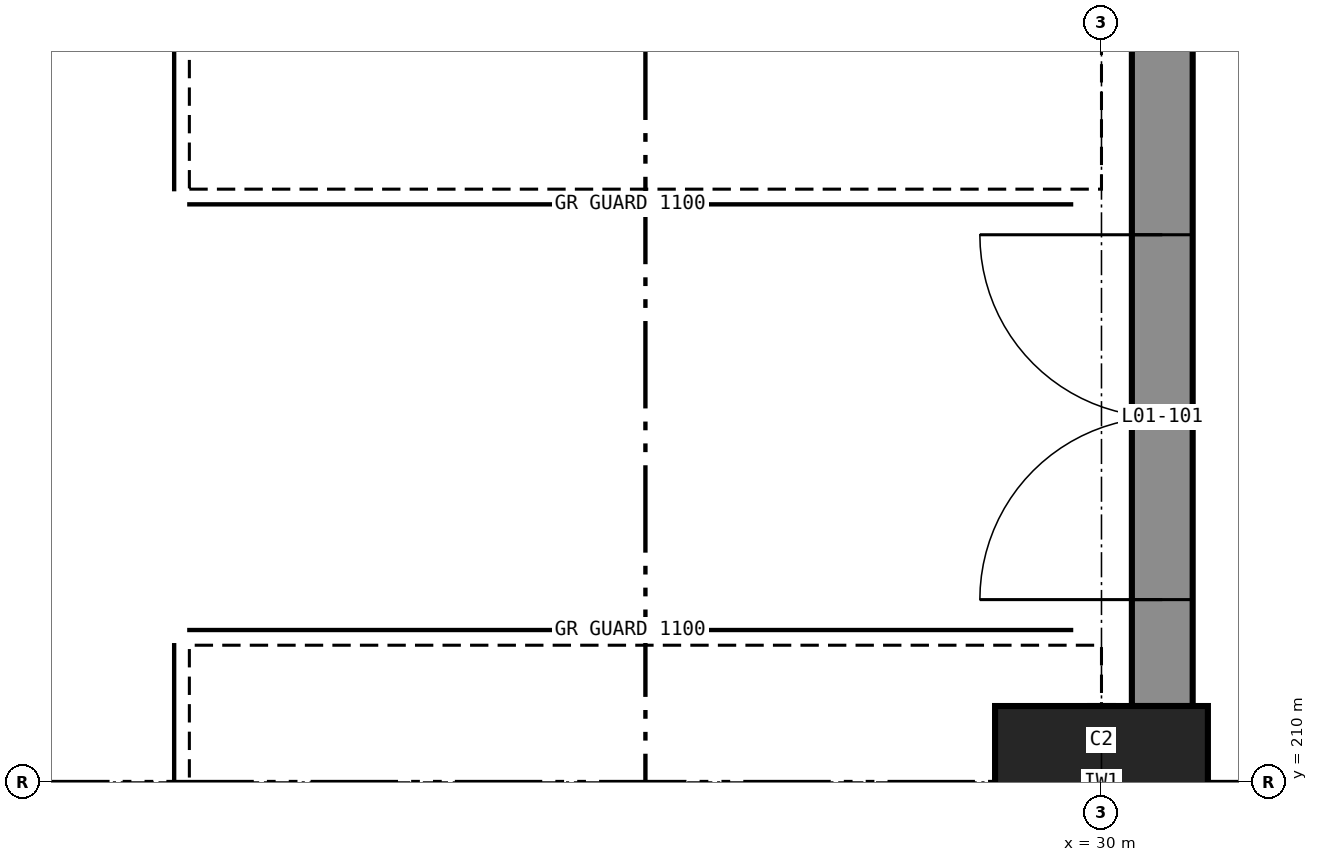
"""IFC4 building model, lengths in metres.
Left out: names, types, materials, properties, quantities, classifications, styles, units other than length and angle.
Written with IfcOpenShell. Run it as: python <this file> out.ifc"""

import sys

from ifc_helpers import new_model, si_unit, direction, frame, frame_2d, origin, origin_2d, place, context, subcontext, project, spatial, rectangle, extrude, element, fill, save


model = new_model("IFC4")
c1 = context("Model", 3, precision=1e-05, world=origin(), true_north=direction((0.0, 1.0)))
c2 = subcontext(c1, "Body", "Model", "MODEL_VIEW")
j1 = project(units=[si_unit("LENGTHUNIT", "METRE"), si_unit("PLANEANGLEUNIT", "RADIAN")], contexts=[c1])
p1 = place(None, origin())
s1 = spatial("IfcSite", under=j1, at=p1, CompositionType="ELEMENT")
p2 = place(p1, origin())
s2 = spatial("IfcBuilding", under=s1, at=p2, CompositionType="ELEMENT")
p3 = place(p2, frame((0.0, 0.0, 6.0)))
s3 = spatial("IfcBuildingStorey", under=s2, at=p3, CompositionType="ELEMENT", Elevation=6.0)
p4 = place(p3, frame((30.0, 210.0, 0.0), z_axis=(0.0, 0.0, 1.0), x_axis=(1.0, 0.0, 0.0)))
e1 = element("IfcColumn", 1, at=p4, inside=s3, PredefinedType="COLUMN", context=c2, shape_type="SweptSolid", body=[
    extrude(rectangle(XDim=1.4, YDim=1.0, at=origin_2d()), origin(), (0.0, 0.0, 1.0), 6.0),
])
p5 = place(p3, frame((30.4, 210.5, 0.0), z_axis=(0.0, 0.0, 1.0), x_axis=(0.0, 1.0, 0.0)))
e2 = element("IfcWall", 2, at=p5, inside=s3, PredefinedType="SOLIDWALL", context=c2, shape_type="SweptSolid", body=[
    extrude(rectangle(XDim=9.5, YDim=0.4, at=frame_2d((4.75, 0.0))), origin(), (0.0, 0.0, 1.0), 6.0),
])
p6 = place(p5, frame((0.7, 0.0, 0.0)))
e3 = element("IfcOpeningElement", 3, at=p6, cuts=e2, PredefinedType="OPENING", context=c2, shape_type="SweptSolid", body=[
    extrude(rectangle(XDim=2.4, YDim=2.4, at=frame_2d((1.2, 1.2))), frame((0.0, 0.21, 0.0), z_axis=(0.0, -1.0, 0.0), x_axis=(1.0, 0.0, 0.0)), (0.0, 0.0, 1.0), 0.42),
])
p7 = place(p3, frame((30.0, 209.5, 0.0), z_axis=(0.0, 0.0, 1.0), x_axis=(0.0, 1.0, 0.0)))
e4 = element("IfcWall", 4, at=p7, inside=s3, PredefinedType="PARTITIONING", context=c2, shape_type="SweptSolid", body=[
    extrude(rectangle(XDim=1.0, YDim=0.15, at=frame_2d((0.5, 0.0))), origin(), (0.0, 0.0, 1.0), 5.75),
])
p8 = place(p6, origin())
e5 = element("IfcDoor", 5, at=p8, inside=s3, OperationType="DOUBLE_DOOR_SINGLE_SWING", PredefinedType="DOOR", context=c2, shape_type="SweptSolid", body=[
    extrude(rectangle(XDim=2.4, YDim=2.4, at=frame_2d((1.2, 1.2))), frame((0.0, 0.025, 0.0), z_axis=(0.0, -1.0, 0.0), x_axis=(1.0, 0.0, 0.0)), (0.0, 0.0, 1.0), 0.05),
])
fill(e3, e5)
save(model, sys.argv[1])
